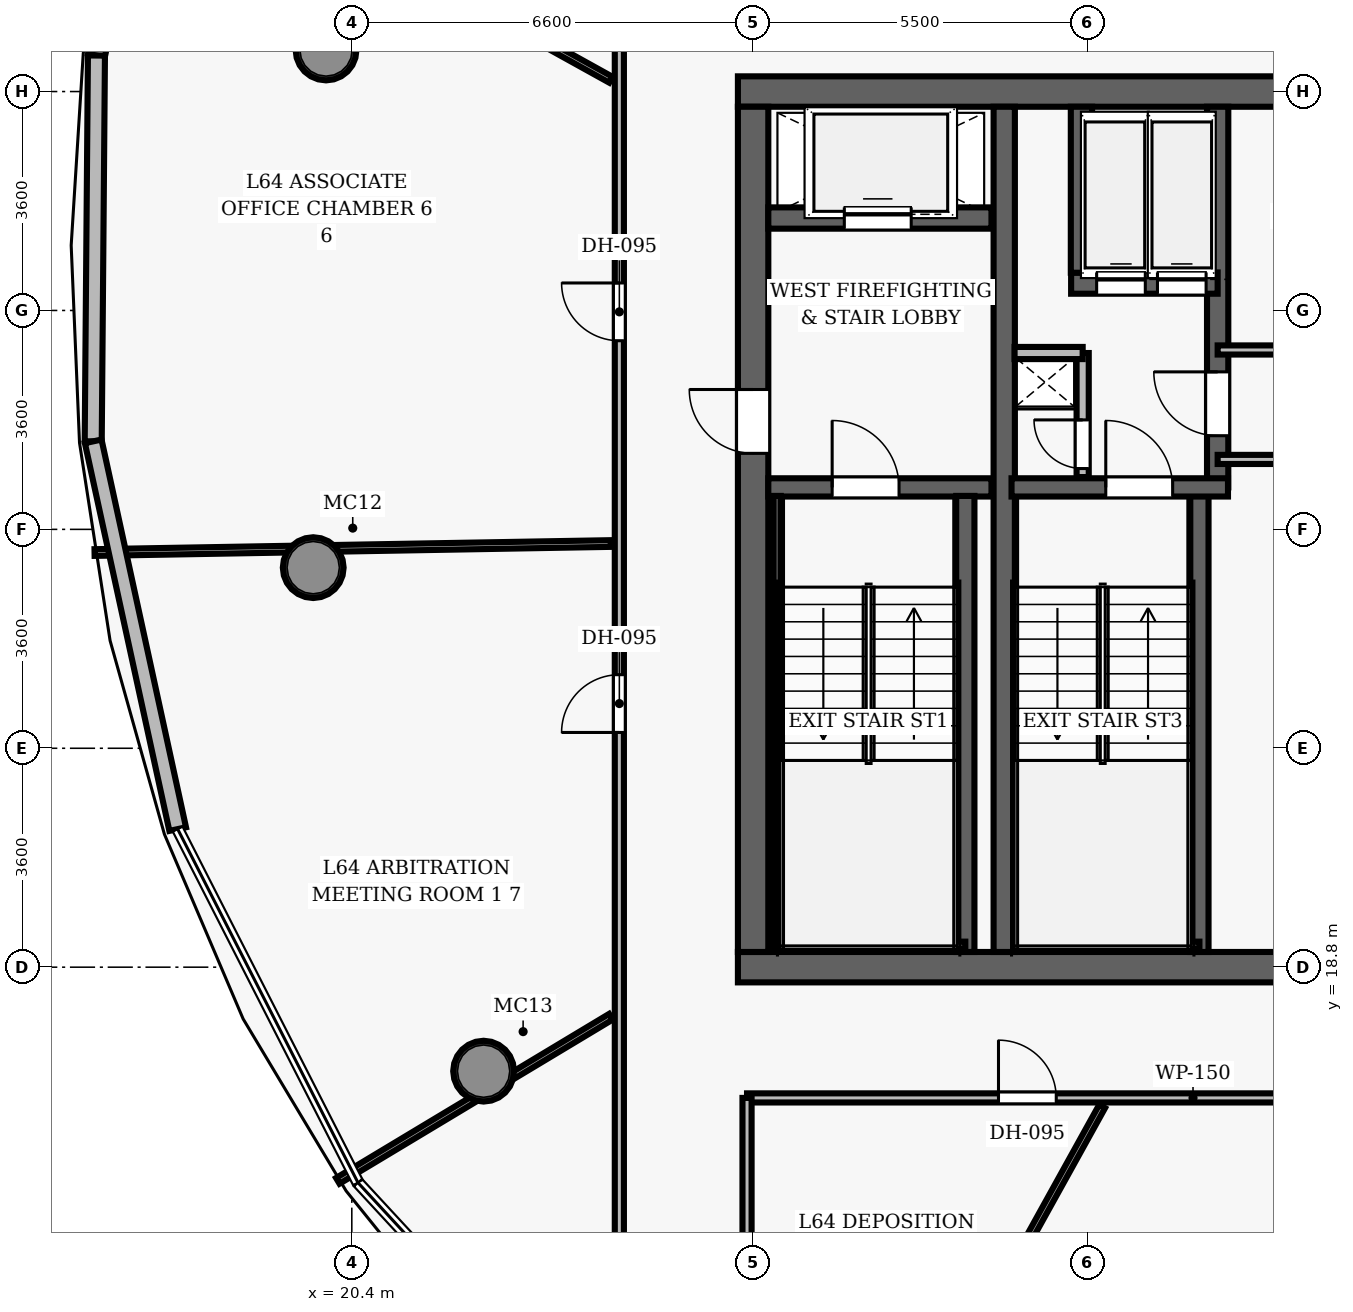
"""IFC4 building model, lengths in metres.
Left out: names, types, materials, properties, quantities, classifications, styles, units other than length and angle.
Written with IfcOpenShell. Run it as: python <this file> out.ifc"""

import sys

from ifc_helpers import new_model, si_unit, direction, frame, frame_2d, origin, origin_2d, place, context, subcontext, project, spatial, rectangle, hollow_circle, extrude, element, fill, save


model = new_model("IFC4")
c1 = context("Model", 3, precision=1e-05, world=origin(), true_north=direction((0.0, 1.0)))
c2 = subcontext(c1, "Body", "Model", "MODEL_VIEW")
j1 = project(units=[si_unit("LENGTHUNIT", "METRE"), si_unit("PLANEANGLEUNIT", "RADIAN")], contexts=[c1])
p1 = place(None, origin())
s1 = spatial("IfcSite", under=j1, at=p1, CompositionType="ELEMENT")
p2 = place(p1, origin())
s2 = spatial("IfcBuilding", under=s1, at=p2, CompositionType="ELEMENT")
p3 = place(p2, frame((0.0, 0.0, 253.6)))
s3 = spatial("IfcBuildingStorey", under=s2, at=p3, CompositionType="ELEMENT", Elevation=253.6)
p4 = place(p3, frame((26.75, 18.8, 0.0), z_axis=(0.0, 0.0, 1.0), x_axis=(1.0, 0.0, 0.0)))
e1 = element("IfcWall", 1, at=p4, inside=s3, PredefinedType="SHEAR", context=c2, shape_type="SweptSolid", body=[
    extrude(rectangle(XDim=22.5, YDim=0.5, at=frame_2d((11.25, 0.0))), origin(), (0.0, 0.0, 1.0), 3.85),
])
p5 = place(p4, frame((14.47, 0.0, 0.0)))
e2 = element("IfcOpeningElement", 2, at=p5, cuts=e1, PredefinedType="OPENING", context=c2, shape_type="SweptSolid", body=[
    extrude(rectangle(XDim=1.05, YDim=2.15, at=frame_2d((0.525, 1.075))), frame((0.0, 0.26, 0.0), z_axis=(0.0, -1.0, 0.0), x_axis=(1.0, 0.0, 0.0)), (0.0, 0.0, 1.0), 0.52),
])
p6 = place(p3, frame((26.75, 33.2, 0.0), z_axis=(0.0, 0.0, 1.0), x_axis=(1.0, 0.0, 0.0)))
e3 = element("IfcWall", 3, at=p6, inside=s3, PredefinedType="SHEAR", context=c2, shape_type="SweptSolid", body=[
    extrude(rectangle(XDim=22.5, YDim=0.5, at=frame_2d((11.25, 0.0))), origin(), (0.0, 0.0, 1.0), 3.85),
])
p7 = place(p3, frame((27.0, 19.05, 0.0), z_axis=(0.0, 0.0, 1.0), x_axis=(0.0, 1.0, 0.0)))
e4 = element("IfcWall", 4, at=p7, inside=s3, PredefinedType="SHEAR", context=c2, shape_type="SweptSolid", body=[
    extrude(rectangle(XDim=13.9, YDim=0.5, at=frame_2d((6.95, 0.0))), origin(), (0.0, 0.0, 1.0), 3.85),
])
p8 = place(p7, frame((8.2, 0.0, 0.0)))
e5 = element("IfcOpeningElement", 5, at=p8, cuts=e4, PredefinedType="OPENING", context=c2, shape_type="SweptSolid", body=[
    extrude(rectangle(XDim=1.05, YDim=2.15, at=frame_2d((0.525, 1.075))), frame((0.0, 0.26, 0.0), z_axis=(0.0, -1.0, 0.0), x_axis=(1.0, 0.0, 0.0)), (0.0, 0.0, 1.0), 0.52),
])
p9 = place(p3, frame((31.13, 19.05, 0.0), z_axis=(0.0, 0.0, 1.0), x_axis=(0.0, 1.0, 0.0)))
e6 = element("IfcWall", 6, at=p9, inside=s3, PredefinedType="SHEAR", context=c2, shape_type="SweptSolid", body=[
    extrude(rectangle(XDim=13.9, YDim=0.35, at=frame_2d((6.95, 0.0))), origin(), (0.0, 0.0, 1.0), 3.85),
])
for number, where, z_axis, x_axis in (
    (7, (19.976, 33.884, 0.0), (0.0, 0.0, 1.0), (1.0, 0.0, 0.0)),
    (8, (19.765, 25.371, 0.0), (0.0, 0.0, 1.0), (1.0, 0.0, 0.0)),
    (9, (22.567, 17.09, 0.0), (0.0, 0.0, 1.0), (1.0, 0.0, 0.0)),
):
    element("IfcColumn", number, at=place(p3, frame(where, z_axis=z_axis, x_axis=x_axis)), inside=s3, PredefinedType="COLUMN", context=c2, shape_type="SweptSolid", body=[
        extrude(hollow_circle(Radius=0.5, WallThickness=0.045, at=origin_2d()), origin(), (0.0, 0.0, 1.0), 3.85),
    ])
p10 = place(p3, frame((27.25, 26.69, 0.0), z_axis=(0.0, 0.0, 1.0), x_axis=(1.0, 0.0, 0.0)))
e10 = element("IfcWall", 10, at=p10, inside=s3, PredefinedType="SHEAR", context=c2, shape_type="SweptSolid", body=[
    extrude(rectangle(XDim=3.67, YDim=0.3, at=frame_2d((1.835, 0.0))), origin(), (0.0, 0.0, 1.0), 3.85),
])
p11 = place(p10, frame((1.05, 0.0, 0.0)))
e11 = element("IfcOpeningElement", 11, at=p11, cuts=e10, PredefinedType="OPENING", context=c2, shape_type="SweptSolid", body=[
    extrude(rectangle(XDim=1.1, YDim=2.15, at=frame_2d((0.55, 1.075))), frame((0.0, 0.16, 0.0), z_axis=(0.0, -1.0, 0.0), x_axis=(1.0, 0.0, 0.0)), (0.0, 0.0, 1.0), 0.32),
])
p12 = place(p3, frame((30.49, 19.05, 0.0), z_axis=(0.0, 0.0, 1.0), x_axis=(0.0, 1.0, 0.0)))
e12 = element("IfcWall", 12, at=p12, inside=s3, PredefinedType="SHEAR", context=c2, shape_type="SweptSolid", body=[
    extrude(rectangle(XDim=7.5, YDim=0.3, at=frame_2d((3.75, 0.0))), origin(), (0.0, 0.0, 1.0), 3.85),
])
p13 = place(p3, frame((27.395, 19.1, 0.0), z_axis=(0.0, 0.0, 1.0), x_axis=(0.0, 1.0, 0.0)))
e13 = element("IfcWall", 13, at=p13, inside=s3, PredefinedType="SHEAR", context=c2, shape_type="SweptSolid", body=[
    extrude(rectangle(XDim=7.45, YDim=0.12, at=frame_2d((3.725, 0.0))), origin(), (0.0, 0.0, 1.0), 3.85),
])
p14 = place(p3, frame((27.395, 19.16, 0.0), z_axis=(0.0, 0.0, 1.0), x_axis=(1.0, 0.0, 0.0)))
e14 = element("IfcWall", 14, at=p14, inside=s3, PredefinedType="SHEAR", context=c2, shape_type="SweptSolid", body=[
    extrude(rectangle(XDim=3.095, YDim=0.12, at=frame_2d((1.547, 0.0))), origin(), (0.0, 0.0, 1.0), 3.85),
])
p15 = place(p3, frame((27.25, 31.12, 0.0), z_axis=(0.0, 0.0, 1.0), x_axis=(1.0, 0.0, 0.0)))
e15 = element("IfcWall", 15, at=p15, inside=s3, PredefinedType="SHEAR", context=c2, shape_type="SweptSolid", body=[
    extrude(rectangle(XDim=3.67, YDim=0.35, at=frame_2d((1.835, 0.0))), origin(), (0.0, 0.0, 1.0), 3.04),
])
p16 = place(p15, frame((1.25, 0.0, 0.0)))
e16 = element("IfcOpeningElement", 16, at=p16, cuts=e15, PredefinedType="OPENING", context=c2, shape_type="SweptSolid", body=[
    extrude(rectangle(XDim=1.1, YDim=2.15, at=frame_2d((0.55, 1.075))), frame((0.0, 0.185, 0.0), z_axis=(0.0, -1.0, 0.0), x_axis=(1.0, 0.0, 0.0)), (0.0, 0.0, 1.0), 0.37),
])
p17 = place(p3, frame((34.34, 19.05, 0.0), z_axis=(0.0, 0.0, 1.0), x_axis=(0.0, 1.0, 0.0)))
e17 = element("IfcWall", 17, at=p17, inside=s3, PredefinedType="SHEAR", context=c2, shape_type="SweptSolid", body=[
    extrude(rectangle(XDim=7.5, YDim=0.3, at=frame_2d((3.75, 0.0))), origin(), (0.0, 0.0, 1.0), 3.85),
])
p18 = place(p3, frame((34.64, 26.69, 0.0), z_axis=(0.0, 0.0, 1.0), x_axis=(0.0, 1.0, 0.0)))
e18 = element("IfcWall", 18, at=p18, inside=s3, PredefinedType="SHEAR", context=c2, shape_type="SweptSolid", body=[
    extrude(rectangle(XDim=6.26, YDim=0.35, at=frame_2d((3.13, 0.0))), origin(), (0.0, 0.0, 1.0), 3.85),
])
p19 = place(p18, frame((0.85, 0.0, 0.0)))
e19 = element("IfcOpeningElement", 19, at=p19, cuts=e18, PredefinedType="OPENING", context=c2, shape_type="SweptSolid", body=[
    extrude(rectangle(XDim=1.05, YDim=2.15, at=frame_2d((0.525, 1.075))), frame((0.0, 0.185, 0.0), z_axis=(0.0, -1.0, 0.0), x_axis=(1.0, 0.0, 0.0)), (0.0, 0.0, 1.0), 0.37),
])
p20 = place(p3, frame((31.25, 26.69, 0.0), z_axis=(0.0, 0.0, 1.0), x_axis=(1.0, 0.0, 0.0)))
e20 = element("IfcWall", 20, at=p20, inside=s3, PredefinedType="SHEAR", context=c2, shape_type="SweptSolid", body=[
    extrude(rectangle(XDim=3.56, YDim=0.3, at=frame_2d((1.78, 0.0))), origin(), (0.0, 0.0, 1.0), 3.85),
])
p21 = place(p20, frame((1.55, 0.0, 0.0)))
e21 = element("IfcOpeningElement", 21, at=p21, cuts=e20, PredefinedType="OPENING", context=c2, shape_type="SweptSolid", body=[
    extrude(rectangle(XDim=1.1, YDim=2.15, at=frame_2d((0.55, 1.075))), frame((0.0, 0.16, 0.0), z_axis=(0.0, -1.0, 0.0), x_axis=(1.0, 0.0, 0.0)), (0.0, 0.0, 1.0), 0.32),
])
p22 = place(p3, frame((31.3, 19.16, 0.0), z_axis=(0.0, 0.0, 1.0), x_axis=(1.0, 0.0, 0.0)))
e22 = element("IfcWall", 22, at=p22, inside=s3, PredefinedType="SHEAR", context=c2, shape_type="SweptSolid", body=[
    extrude(rectangle(XDim=3.04, YDim=0.12, at=frame_2d((1.52, 0.0))), origin(), (0.0, 0.0, 1.0), 3.85),
])
p23 = place(p3, frame((32.23, 30.05, 0.0), z_axis=(0.0, 0.0, 1.0), x_axis=(1.0, 0.0, 0.0)))
e23 = element("IfcWall", 23, at=p23, inside=s3, PredefinedType="SHEAR", context=c2, shape_type="SweptSolid", body=[
    extrude(rectangle(XDim=2.41, YDim=0.35, at=frame_2d((1.205, 0.0))), origin(), (0.0, 0.0, 1.0), 3.04),
])
p24 = place(p23, frame((0.42, 0.0, 0.0)))
e24 = element("IfcOpeningElement", 24, at=p24, cuts=e23, PredefinedType="OPENING", context=c2, shape_type="SweptSolid", body=[
    extrude(rectangle(XDim=0.8, YDim=2.15, at=frame_2d((0.4, 1.075))), frame((0.0, 0.185, 0.0), z_axis=(0.0, -1.0, 0.0), x_axis=(1.0, 0.0, 0.0)), (0.0, 0.0, 1.0), 0.37),
])
p25 = place(p23, frame((1.42, 0.0, 0.0)))
e25 = element("IfcOpeningElement", 25, at=p25, cuts=e23, PredefinedType="OPENING", context=c2, shape_type="SweptSolid", body=[
    extrude(rectangle(XDim=0.8, YDim=2.15, at=frame_2d((0.4, 1.075))), frame((0.0, 0.185, 0.0), z_axis=(0.0, -1.0, 0.0), x_axis=(1.0, 0.0, 0.0)), (0.0, 0.0, 1.0), 0.37),
])
p26 = place(p3, frame((32.4, 30.22, 0.0), z_axis=(0.0, 0.0, 1.0), x_axis=(0.0, 1.0, 0.0)))
e26 = element("IfcWall", 26, at=p26, inside=s3, PredefinedType="SHEAR", context=c2, shape_type="SweptSolid", body=[
    extrude(rectangle(XDim=2.73, YDim=0.35, at=frame_2d((1.365, 0.0))), origin(), (0.0, 0.0, 1.0), 3.04),
])
p27 = place(p3, frame((32.42, 26.86, 0.0), z_axis=(0.0, 0.0, 1.0), x_axis=(0.0, 1.0, 0.0)))
e27 = element("IfcWall", 27, at=p27, inside=s3, PredefinedType="PARTITIONING", context=c2, shape_type="SweptSolid", body=[
    extrude(rectangle(XDim=2.04, YDim=0.2, at=frame_2d((1.02, 0.0))), origin(), (0.0, 0.0, 1.0), 3.04),
])
p28 = place(p27, frame((0.14, 0.0, 0.0)))
e28 = element("IfcOpeningElement", 28, at=p28, cuts=e27, PredefinedType="OPENING", context=c2, shape_type="SweptSolid", body=[
    extrude(rectangle(XDim=0.8, YDim=2.05, at=frame_2d((0.4, 1.025))), frame((0.0, 0.11, 0.0), z_axis=(0.0, -1.0, 0.0), x_axis=(1.0, 0.0, 0.0)), (0.0, 0.0, 1.0), 0.22),
])
p29 = place(p3, frame((31.3, 28.9, 0.0), z_axis=(0.0, 0.0, 1.0), x_axis=(1.0, 0.0, 0.0)))
e29 = element("IfcWall", 29, at=p29, inside=s3, PredefinedType="PARTITIONING", context=c2, shape_type="SweptSolid", body=[
    extrude(rectangle(XDim=1.12, YDim=0.2, at=frame_2d((0.56, 0.0))), origin(), (0.0, 0.0, 1.0), 3.04),
])
for number, where, z_axis, x_axis in (
    (30, (34.64, 27.15, 0.0), (0.0, 0.0, 1.0), (1.0, 0.0, 0.0)),
    (31, (34.64, 28.95, 0.0), (0.0, 0.0, 1.0), (1.0, 0.0, 0.0)),
):
    element("IfcWall", number, at=place(p3, frame(where, z_axis=z_axis, x_axis=x_axis)), inside=s3, PredefinedType="PARTITIONING", context=c2, shape_type="SweptSolid", body=[
        extrude(rectangle(XDim=6.36, YDim=0.15, at=frame_2d((3.18, 0.0))), origin(), (0.0, 0.0, 1.0), 3.04),
    ])
p30 = place(p3, frame((26.9, 16.65, 0.0), z_axis=(0.0, 0.0, 1.0), x_axis=(1.0, 0.0, 0.0)))
e32 = element("IfcWall", 32, at=p30, inside=s3, PredefinedType="PARTITIONING", context=c2, shape_type="SweptSolid", body=[
    extrude(rectangle(XDim=22.2, YDim=0.15, at=frame_2d((11.1, 0.0))), origin(), (0.0, 0.0, 1.0), 3.04),
])
p31 = place(p30, frame((4.135, 0.0, 0.0)))
e33 = element("IfcOpeningElement", 33, at=p31, cuts=e32, PredefinedType="OPENING", context=c2, shape_type="SweptSolid", body=[
    extrude(rectangle(XDim=0.95, YDim=2.15, at=frame_2d((0.475, 1.075))), frame((0.0, 0.085, 0.0), z_axis=(0.0, -1.0, 0.0), x_axis=(1.0, 0.0, 0.0)), (0.0, 0.0, 1.0), 0.17),
])
p32 = place(p30, frame((9.584, 0.0, 0.0)))
e34 = element("IfcOpeningElement", 34, at=p32, cuts=e32, PredefinedType="OPENING", context=c2, shape_type="SweptSolid", body=[
    extrude(rectangle(XDim=0.95, YDim=2.15, at=frame_2d((0.475, 1.075))), frame((0.0, 0.085, 0.0), z_axis=(0.0, -1.0, 0.0), x_axis=(1.0, 0.0, 0.0)), (0.0, 0.0, 1.0), 0.17),
])
p33 = place(p30, frame((14.473, 0.0, 0.0)))
e35 = element("IfcOpeningElement", 35, at=p33, cuts=e32, PredefinedType="OPENING", context=c2, shape_type="SweptSolid", body=[
    extrude(rectangle(XDim=0.95, YDim=2.15, at=frame_2d((0.475, 1.075))), frame((0.0, 0.085, 0.0), z_axis=(0.0, -1.0, 0.0), x_axis=(1.0, 0.0, 0.0)), (0.0, 0.0, 1.0), 0.17),
])
p34 = place(p30, frame((17.445, 0.0, 0.0)))
e36 = element("IfcOpeningElement", 36, at=p34, cuts=e32, PredefinedType="OPENING", context=c2, shape_type="SweptSolid", body=[
    extrude(rectangle(XDim=0.95, YDim=2.15, at=frame_2d((0.475, 1.075))), frame((0.0, 0.085, 0.0), z_axis=(0.0, -1.0, 0.0), x_axis=(1.0, 0.0, 0.0)), (0.0, 0.0, 1.0), 0.17),
])
p35 = place(p3, frame((24.8, 11.317, 0.0), z_axis=(0.0, 0.0, 1.0), x_axis=(0.0, 1.0, 0.0)))
e37 = element("IfcWall", 37, at=p35, inside=s3, PredefinedType="PARTITIONING", context=c2, shape_type="SweptSolid", body=[
    extrude(rectangle(XDim=30.083, YDim=0.15, at=frame_2d((15.042, 0.0))), origin(), (0.0, 0.0, 1.0), 3.04),
])
p36 = place(p35, frame((17.785, 0.0, 0.0)))
e38 = element("IfcOpeningElement", 38, at=p36, cuts=e37, PredefinedType="OPENING", context=c2, shape_type="SweptSolid", body=[
    extrude(rectangle(XDim=0.95, YDim=2.15, at=frame_2d((0.475, 1.075))), frame((0.0, 0.085, 0.0), z_axis=(0.0, -1.0, 0.0), x_axis=(1.0, 0.0, 0.0)), (0.0, 0.0, 1.0), 0.17),
])
p37 = place(p35, frame((11.343, 0.0, 0.0)))
e39 = element("IfcOpeningElement", 39, at=p37, cuts=e37, PredefinedType="OPENING", context=c2, shape_type="SweptSolid", body=[
    extrude(rectangle(XDim=0.95, YDim=2.15, at=frame_2d((0.475, 1.075))), frame((0.0, 0.085, 0.0), z_axis=(0.0, -1.0, 0.0), x_axis=(1.0, 0.0, 0.0)), (0.0, 0.0, 1.0), 0.17),
])
p38 = place(p3, frame((26.9, 11.317, 0.0), z_axis=(0.0, 0.0, 1.0), x_axis=(0.0, 1.0, 0.0)))
e40 = element("IfcWall", 40, at=p38, inside=s3, PredefinedType="PARTITIONING", context=c2, shape_type="SweptSolid", body=[
    extrude(rectangle(XDim=5.333, YDim=0.15, at=frame_2d((2.667, 0.0))), origin(), (0.0, 0.0, 1.0), 3.04),
])
p39 = place(p3, frame((24.66, 33.395, 0.0), z_axis=(0.0, 0.0, 1.0), x_axis=(-0.874629144462, 0.484792594475, 0.0)))
e41 = element("IfcWall", 41, at=p39, inside=s3, PredefinedType="PARTITIONING", context=c2, shape_type="SweptSolid", body=[
    extrude(rectangle(XDim=9.071, YDim=0.11, at=frame_2d((4.535, 0.0))), origin(), (0.0, 0.0, 1.0), 3.04),
])
p40 = place(p3, frame((24.66, 25.767, 0.0), z_axis=(0.0, 0.0, 1.0), x_axis=(-0.999847721367, -0.017450904792, 0.0)))
e42 = element("IfcWall", 42, at=p40, inside=s3, PredefinedType="PARTITIONING", context=c2, shape_type="SweptSolid", body=[
    extrude(rectangle(XDim=8.492, YDim=0.11, at=frame_2d((4.246, 0.0))), origin(), (0.0, 0.0, 1.0), 3.04),
])
p41 = place(p3, frame((24.66, 17.985, 0.0), z_axis=(0.0, 0.0, 1.0), x_axis=(-0.857147311937, -0.51507134034, 0.0)))
e43 = element("IfcWall", 43, at=p41, inside=s3, PredefinedType="PARTITIONING", context=c2, shape_type="SweptSolid", body=[
    extrude(rectangle(XDim=5.239, YDim=0.11, at=frame_2d((2.619, 0.0))), origin(), (0.0, 0.0, 1.0), 3.04),
])
p42 = place(p3, frame((32.74, 16.51, 0.0), z_axis=(0.0, 0.0, 1.0), x_axis=(-0.484794445223, -0.87462811862, 0.0)))
e44 = element("IfcWall", 44, at=p42, inside=s3, PredefinedType="PARTITIONING", context=c2, shape_type="SweptSolid", body=[
    extrude(rectangle(XDim=9.726, YDim=0.11, at=frame_2d((4.863, 0.0))), origin(), (0.0, 0.0, 1.0), 3.04),
])
p43 = place(p3, frame((16.2, 33.792, 0.0), z_axis=(0.0, 0.0, 1.0), x_axis=(0.215681903997, 0.97646367894, 0.0)))
e45 = element("IfcWall", 45, at=p43, inside=s3, PredefinedType="SOLIDWALL", context=c2, shape_type="SweptSolid", body=[
    extrude(rectangle(XDim=5.86, YDim=0.28, at=frame_2d((2.93, 0.0))), origin(), (0.0, 0.0, 1.0), 3.625),
])
p44 = place(p3, frame((16.147, 27.447, 0.0), z_axis=(0.0, 0.0, 1.0), x_axis=(0.008349395362, 0.999965143191, 0.0)))
e46 = element("IfcWall", 46, at=p44, inside=s3, PredefinedType="SOLIDWALL", context=c2, shape_type="SweptSolid", body=[
    extrude(rectangle(XDim=6.345, YDim=0.28, at=frame_2d((3.173, 0.0))), origin(), (0.0, 0.0, 1.0), 3.625),
])
p45 = place(p3, frame((17.537, 21.071, 0.0), z_axis=(0.0, 0.0, 1.0), x_axis=(-0.21290021568, 0.977073947132, 0.0)))
e47 = element("IfcWall", 47, at=p45, inside=s3, PredefinedType="SOLIDWALL", context=c2, shape_type="SweptSolid", body=[
    extrude(rectangle(XDim=6.526, YDim=0.28, at=frame_2d((3.263, 0.0))), origin(), (0.0, 0.0, 1.0), 3.625),
])
p46 = place(p11, origin())
e48 = element("IfcDoor", 48, at=p46, inside=s3, OperationType="SINGLE_SWING_LEFT", PredefinedType="DOOR", context=c2, shape_type="SweptSolid", body=[
    extrude(rectangle(XDim=1.1, YDim=2.15, at=frame_2d((0.55, 1.075))), frame((0.0, 0.025, 0.0), z_axis=(0.0, -1.0, 0.0), x_axis=(1.0, 0.0, 0.0)), (0.0, 0.0, 1.0), 0.05),
])
fill(e11, e48)
p47 = place(p8, origin())
e49 = element("IfcDoor", 49, at=p47, inside=s3, OperationType="SINGLE_SWING_RIGHT", PredefinedType="DOOR", context=c2, shape_type="SweptSolid", body=[
    extrude(rectangle(XDim=1.05, YDim=2.15, at=frame_2d((0.525, 1.075))), frame((0.0, 0.025, 0.0), z_axis=(0.0, -1.0, 0.0), x_axis=(1.0, 0.0, 0.0)), (0.0, 0.0, 1.0), 0.05),
])
fill(e5, e49)
p48 = place(p21, origin())
e50 = element("IfcDoor", 50, at=p48, inside=s3, OperationType="SINGLE_SWING_LEFT", PredefinedType="DOOR", context=c2, shape_type="SweptSolid", body=[
    extrude(rectangle(XDim=1.1, YDim=2.15, at=frame_2d((0.55, 1.075))), frame((0.0, 0.025, 0.0), z_axis=(0.0, -1.0, 0.0), x_axis=(1.0, 0.0, 0.0)), (0.0, 0.0, 1.0), 0.05),
])
fill(e21, e50)
p49 = place(p28, origin())
e51 = element("IfcDoor", 51, at=p49, inside=s3, OperationType="SINGLE_SWING_RIGHT", PredefinedType="DOOR", context=c2, shape_type="SweptSolid", body=[
    extrude(rectangle(XDim=0.8, YDim=2.05, at=frame_2d((0.4, 1.025))), frame((0.0, 0.025, 0.0), z_axis=(0.0, -1.0, 0.0), x_axis=(1.0, 0.0, 0.0)), (0.0, 0.0, 1.0), 0.05),
])
fill(e28, e51)
p50 = place(p19, origin())
e52 = element("IfcDoor", 52, at=p50, inside=s3, OperationType="SINGLE_SWING_RIGHT", PredefinedType="DOOR", context=c2, shape_type="SweptSolid", body=[
    extrude(rectangle(XDim=1.05, YDim=2.15, at=frame_2d((0.525, 1.075))), frame((0.0, 0.025, 0.0), z_axis=(0.0, -1.0, 0.0), x_axis=(1.0, 0.0, 0.0)), (0.0, 0.0, 1.0), 0.05),
])
fill(e19, e52)
p51 = place(p36, origin())
e53 = element("IfcDoor", 53, at=p51, inside=s3, OperationType="SINGLE_SWING_RIGHT", PredefinedType="DOOR", context=c2, shape_type="SweptSolid", body=[
    extrude(rectangle(XDim=0.95, YDim=2.15, at=frame_2d((0.475, 1.075))), frame((0.0, 0.025, 0.0), z_axis=(0.0, -1.0, 0.0), x_axis=(1.0, 0.0, 0.0)), (0.0, 0.0, 1.0), 0.05),
])
fill(e38, e53)
p52 = place(p37, origin())
e54 = element("IfcDoor", 54, at=p52, inside=s3, OperationType="SINGLE_SWING_LEFT", PredefinedType="DOOR", context=c2, shape_type="SweptSolid", body=[
    extrude(rectangle(XDim=0.95, YDim=2.15, at=frame_2d((0.475, 1.075))), frame((0.0, 0.025, 0.0), z_axis=(0.0, -1.0, 0.0), x_axis=(1.0, 0.0, 0.0)), (0.0, 0.0, 1.0), 0.05),
])
fill(e39, e54)
p53 = place(p31, origin())
e55 = element("IfcDoor", 55, at=p53, inside=s3, OperationType="SINGLE_SWING_LEFT", PredefinedType="DOOR", context=c2, shape_type="SweptSolid", body=[
    extrude(rectangle(XDim=0.95, YDim=2.15, at=frame_2d((0.475, 1.075))), frame((0.0, 0.025, 0.0), z_axis=(0.0, -1.0, 0.0), x_axis=(1.0, 0.0, 0.0)), (0.0, 0.0, 1.0), 0.05),
])
fill(e33, e55)
p54 = place(p16, origin())
e56 = element("IfcDoor", 56, at=p54, inside=s3, OperationType="SLIDING_TO_LEFT", PredefinedType="DOOR", context=c2, shape_type="SweptSolid", body=[
    extrude(rectangle(XDim=1.1, YDim=2.15, at=frame_2d((0.55, 1.075))), frame((0.0, 0.025, 0.0), z_axis=(0.0, -1.0, 0.0), x_axis=(1.0, 0.0, 0.0)), (0.0, 0.0, 1.0), 0.05),
])
fill(e16, e56)
p55 = place(p24, origin())
e57 = element("IfcDoor", 57, at=p55, inside=s3, OperationType="SLIDING_TO_LEFT", PredefinedType="DOOR", context=c2, shape_type="SweptSolid", body=[
    extrude(rectangle(XDim=0.8, YDim=2.15, at=frame_2d((0.4, 1.075))), frame((0.0, 0.025, 0.0), z_axis=(0.0, -1.0, 0.0), x_axis=(1.0, 0.0, 0.0)), (0.0, 0.0, 1.0), 0.05),
])
fill(e24, e57)
p56 = place(p25, origin())
e58 = element("IfcDoor", 58, at=p56, inside=s3, OperationType="SLIDING_TO_LEFT", PredefinedType="DOOR", context=c2, shape_type="SweptSolid", body=[
    extrude(rectangle(XDim=0.8, YDim=2.15, at=frame_2d((0.4, 1.075))), frame((0.0, 0.025, 0.0), z_axis=(0.0, -1.0, 0.0), x_axis=(1.0, 0.0, 0.0)), (0.0, 0.0, 1.0), 0.05),
])
fill(e25, e58)
save(model, sys.argv[1])
